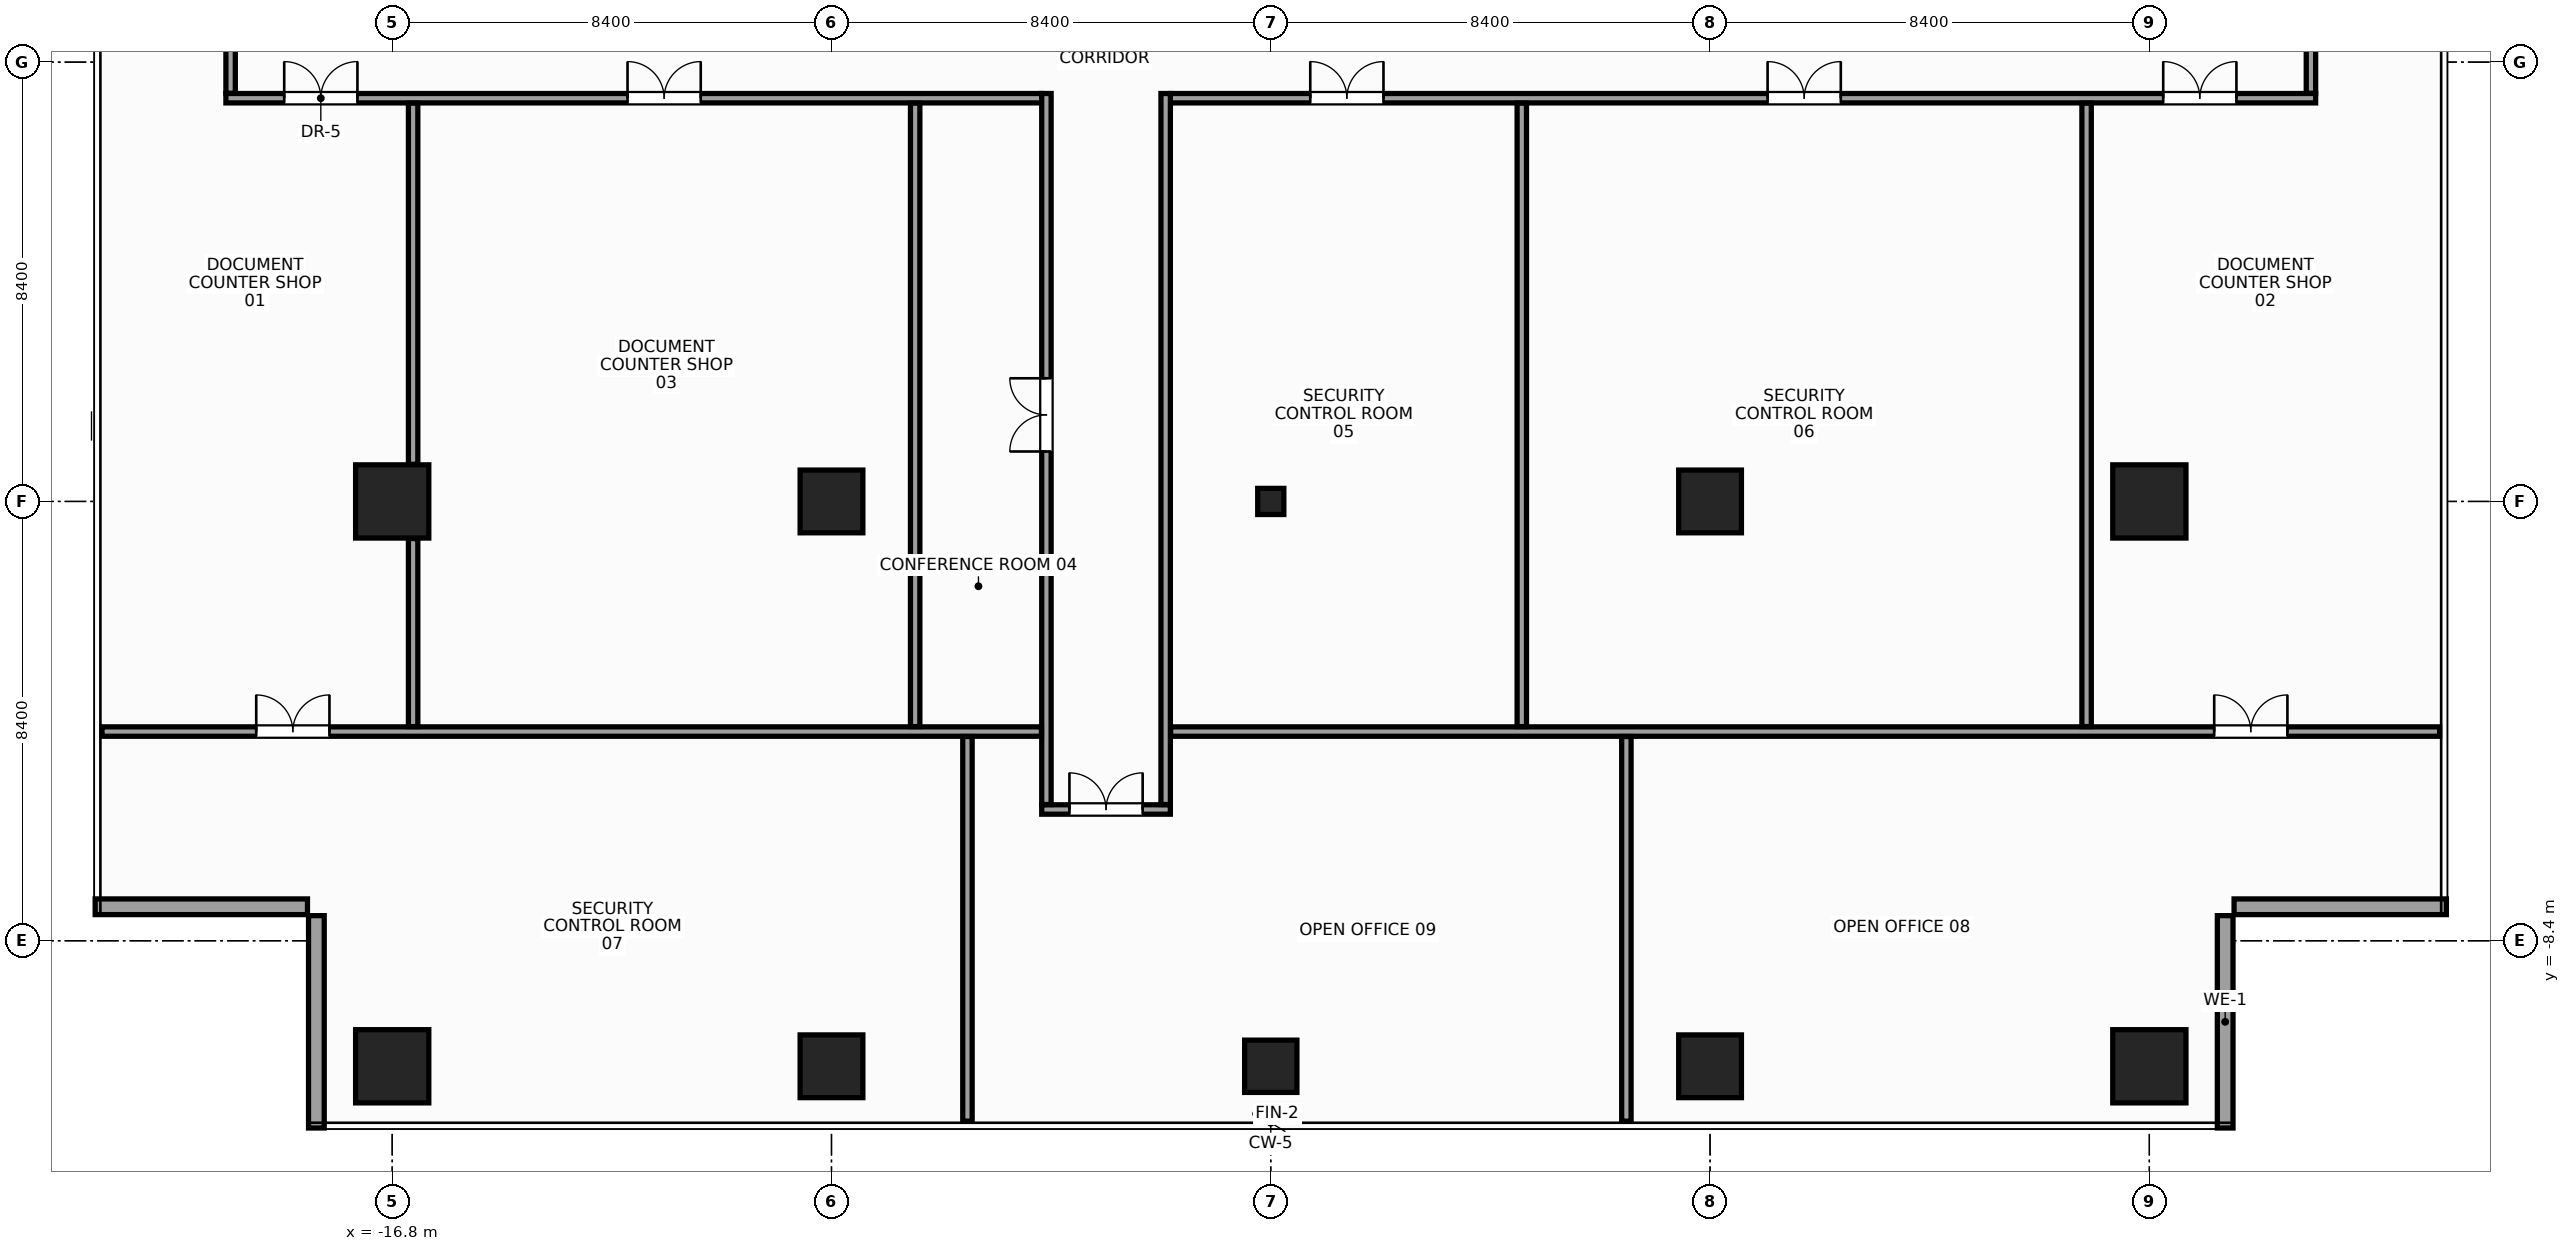
"""IFC4 building model, lengths in metres.
Left out: names, types, materials, properties, quantities, classifications, styles, units other than length and angle.
Written with IfcOpenShell. Run it as: python <this file> out.ifc"""

import sys

from ifc_helpers import new_model, si_unit, direction, frame, frame_2d, origin, origin_with_axes, origin_2d, place, context, subcontext, project, spatial, rectangle, hollow_rectangle, extrude, source, transform, mapped, element, fill, save


model = new_model("IFC4")
c1 = context("Model", 3, precision=1e-05, world=origin(), true_north=direction((0.0, 1.0)))
c2 = subcontext(c1, "Body", "Model", "MODEL_VIEW")
j1 = project(units=[si_unit("LENGTHUNIT", "METRE"), si_unit("PLANEANGLEUNIT", "RADIAN")], contexts=[c1])
p1 = place(None, origin())
s1 = spatial("IfcSite", under=j1, at=p1, CompositionType="ELEMENT")
p2 = place(p1, origin())
s2 = spatial("IfcBuilding", under=s1, at=p2, CompositionType="ELEMENT")
p3 = place(p2, frame((0.0, 0.0, 268.4)))
s3 = spatial("IfcBuildingStorey", under=s2, at=p3, CompositionType="ELEMENT", Elevation=268.4)
m1 = source(origin(), c2, "Body", "SweptSolid", [
    extrude(rectangle(XDim=1.4, YDim=1.4, at=origin_2d()), origin(), (0.0, 0.0, 1.0), 3.6),
])
for number, where, z_axis, x_axis in (
    (1, (-16.8, -10.8, 0.0), (0.0, 0.0, 1.0), (1.0, 0.0, 0.0)),
    (2, (-16.8, 0.0, 0.0), (0.0, 0.0, 1.0), (1.0, 0.0, 0.0)),
    (3, (16.8, -10.8, 0.0), (0.0, 0.0, 1.0), (1.0, 0.0, 0.0)),
    (4, (16.8, 0.0, 0.0), (0.0, 0.0, 1.0), (1.0, 0.0, 0.0)),
):
    element("IfcColumn", number, at=place(p3, frame(where, z_axis=z_axis, x_axis=x_axis)), inside=s3, PredefinedType="COLUMN", context=c2, shape_type="MappedRepresentation", body=[
        mapped(m1, transform((0.0, 0.0, 0.0), x_axis=(1.0, 0.0, 0.0), y_axis=(0.0, 1.0, 0.0), z_axis=(0.0, 0.0, 1.0), scale=1.0)),
    ])
m2 = source(origin(), c2, "Body", "SweptSolid", [
    extrude(rectangle(XDim=1.2, YDim=1.2, at=origin_2d()), origin(), (0.0, 0.0, 1.0), 3.6),
])
for number, where, z_axis, x_axis in (
    (5, (-8.4, 0.0, 0.0), (0.0, 0.0, 1.0), (1.0, 0.0, 0.0)),
    (6, (-8.4, -10.8, 0.0), (0.0, 0.0, 1.0), (1.0, 0.0, 0.0)),
    (7, (8.4, 0.0, 0.0), (0.0, 0.0, 1.0), (1.0, 0.0, 0.0)),
    (8, (8.4, -10.8, 0.0), (0.0, 0.0, 1.0), (1.0, 0.0, 0.0)),
):
    element("IfcColumn", number, at=place(p3, frame(where, z_axis=z_axis, x_axis=x_axis)), inside=s3, PredefinedType="COLUMN", context=c2, shape_type="MappedRepresentation", body=[
        mapped(m2, transform((0.0, 0.0, 0.0), x_axis=(1.0, 0.0, 0.0), y_axis=(0.0, 1.0, 0.0), z_axis=(0.0, 0.0, 1.0), scale=1.0)),
    ])
m3 = source(origin(), c2, "Body", "SweptSolid", [
    extrude(rectangle(XDim=1.0, YDim=1.0, at=origin_2d()), origin(), (0.0, 0.0, 1.0), 3.6),
])
p4 = place(p3, frame((0.0, -10.8, 0.0), z_axis=(0.0, 0.0, 1.0), x_axis=(1.0, 0.0, 0.0)))
e9 = element("IfcColumn", 9, at=p4, inside=s3, PredefinedType="COLUMN", context=c2, shape_type="MappedRepresentation", body=[
    mapped(m3, transform((0.0, 0.0, 0.0), x_axis=(1.0, 0.0, 0.0), y_axis=(0.0, 1.0, 0.0), z_axis=(0.0, 0.0, 1.0), scale=1.0)),
])
m4 = source(origin(), c2, "Body", "SweptSolid", [
    extrude(hollow_rectangle(XDim=0.5, YDim=0.5, WallThickness=0.025, at=origin_2d()), origin(), (0.0, 0.0, 1.0), 3.6),
])
p5 = place(p3, origin_with_axes())
e10 = element("IfcColumn", 10, at=p5, inside=s3, PredefinedType="COLUMN", context=c2, shape_type="MappedRepresentation", body=[
    mapped(m4, transform((0.0, 0.0, 0.0), x_axis=(1.0, 0.0, 0.0), y_axis=(0.0, 1.0, 0.0), z_axis=(0.0, 0.0, 1.0), scale=1.0)),
])
m5 = source(origin(), c2, "Body", "SweptSolid", [
    extrude(rectangle(XDim=4.06, YDim=0.3, at=frame_2d((2.03, 0.0))), origin(), (0.0, 0.0, 1.0), 2.75),
])
for number, where, z_axis, x_axis in (
    (11, (18.25, -11.98, 0.0), (0.0, 0.0, 1.0), (0.0, 1.0, 0.0)),
    (12, (18.42, -7.75, 0.0), (0.0, 0.0, 1.0), (1.0, 0.0, 0.0)),
    (13, (-22.48, -7.75, 0.0), (0.0, 0.0, 1.0), (1.0, 0.0, 0.0)),
    (14, (-18.25, -7.92, 0.0), (0.0, 0.0, 1.0), (0.0, -1.0, 0.0)),
):
    element("IfcWall", number, at=place(p3, frame(where, z_axis=z_axis, x_axis=x_axis)), inside=s3, PredefinedType="STANDARD", context=c2, shape_type="MappedRepresentation", body=[
        mapped(m5, transform((0.0, 0.0, 0.0), x_axis=(1.0, 0.0, 0.0), y_axis=(0.0, 1.0, 0.0), z_axis=(0.0, 0.0, 1.0), scale=1.0)),
    ])
m6 = source(origin(), c2, "Body", "SweptSolid", [
    extrude(rectangle(XDim=15.6, YDim=0.18, at=frame_2d((7.8, 0.0))), origin(), (0.0, 0.0, 1.0), 2.755),
])
p6 = place(p3, frame((-19.98, 7.71, 0.0), z_axis=(0.0, 0.0, 1.0), x_axis=(1.0, 0.0, 0.0)))
e15 = element("IfcWall", 15, at=p6, inside=s3, PredefinedType="PARTITIONING", context=c2, shape_type="MappedRepresentation", body=[
    mapped(m6, transform((0.0, 0.0, 0.0), x_axis=(1.0, 0.0, 0.0), y_axis=(0.0, 1.0, 0.0), z_axis=(0.0, 0.0, 1.0), scale=1.0)),
])
p7 = place(p6, frame((1.115, 0.0, 0.0)))
e16 = element("IfcOpeningElement", 16, at=p7, cuts=e15, PredefinedType="OPENING", context=c2, shape_type="SweptSolid", body=[
    extrude(rectangle(XDim=1.4, YDim=2.2, at=frame_2d((0.7, 1.1))), frame((0.0, 0.102, 0.0), z_axis=(0.0, -1.0, 0.0), x_axis=(1.0, 0.0, 0.0)), (0.0, 0.0, 1.0), 0.204),
])
p8 = place(p6, frame((7.68, 0.0, 0.0)))
e17 = element("IfcOpeningElement", 17, at=p8, cuts=e15, PredefinedType="OPENING", context=c2, shape_type="SweptSolid", body=[
    extrude(rectangle(XDim=1.4, YDim=2.2, at=frame_2d((0.7, 1.1))), frame((0.0, 0.102, 0.0), z_axis=(0.0, -1.0, 0.0), x_axis=(1.0, 0.0, 0.0)), (0.0, 0.0, 1.0), 0.204),
])
m7 = source(origin(), c2, "Body", "SweptSolid", [
    extrude(rectangle(XDim=21.9, YDim=0.18, at=frame_2d((10.95, 0.0))), origin(), (0.0, 0.0, 1.0), 2.755),
])
p9 = place(p3, frame((-1.92, 7.71, 0.0), z_axis=(0.0, 0.0, 1.0), x_axis=(1.0, 0.0, 0.0)))
e18 = element("IfcWall", 18, at=p9, inside=s3, PredefinedType="PARTITIONING", context=c2, shape_type="MappedRepresentation", body=[
    mapped(m7, transform((0.0, 0.0, 0.0), x_axis=(1.0, 0.0, 0.0), y_axis=(0.0, 1.0, 0.0), z_axis=(0.0, 0.0, 1.0), scale=1.0)),
])
p10 = place(p9, frame((18.985, 0.0, 0.0)))
e19 = element("IfcOpeningElement", 19, at=p10, cuts=e18, PredefinedType="OPENING", context=c2, shape_type="SweptSolid", body=[
    extrude(rectangle(XDim=1.4, YDim=2.2, at=frame_2d((0.7, 1.1))), frame((0.0, 0.102, 0.0), z_axis=(0.0, -1.0, 0.0), x_axis=(1.0, 0.0, 0.0)), (0.0, 0.0, 1.0), 0.204),
])
p11 = place(p9, frame((2.675, 0.0, 0.0)))
e20 = element("IfcOpeningElement", 20, at=p11, cuts=e18, PredefinedType="OPENING", context=c2, shape_type="SweptSolid", body=[
    extrude(rectangle(XDim=1.4, YDim=2.2, at=frame_2d((0.7, 1.1))), frame((0.0, 0.102, 0.0), z_axis=(0.0, -1.0, 0.0), x_axis=(1.0, 0.0, 0.0)), (0.0, 0.0, 1.0), 0.204),
])
p12 = place(p9, frame((11.42, 0.0, 0.0)))
e21 = element("IfcOpeningElement", 21, at=p12, cuts=e18, PredefinedType="OPENING", context=c2, shape_type="SweptSolid", body=[
    extrude(rectangle(XDim=1.4, YDim=2.2, at=frame_2d((0.7, 1.1))), frame((0.0, 0.102, 0.0), z_axis=(0.0, -1.0, 0.0), x_axis=(1.0, 0.0, 0.0)), (0.0, 0.0, 1.0), 0.204),
])
m8 = source(origin(), c2, "Body", "SweptSolid", [
    extrude(rectangle(XDim=2.46, YDim=0.18, at=frame_2d((1.23, 0.0))), origin(), (0.0, 0.0, 1.0), 3.37),
])
p13 = place(p3, frame((-4.38, -5.89, 0.0), z_axis=(0.0, 0.0, 1.0), x_axis=(1.0, 0.0, 0.0)))
e22 = element("IfcWall", 22, at=p13, inside=s3, PredefinedType="PARTITIONING", context=c2, shape_type="MappedRepresentation", body=[
    mapped(m8, transform((0.0, 0.0, 0.0), x_axis=(1.0, 0.0, 0.0), y_axis=(0.0, 1.0, 0.0), z_axis=(0.0, 0.0, 1.0), scale=1.0)),
])
p14 = place(p13, frame((0.53, 0.0, 0.0)))
e23 = element("IfcOpeningElement", 23, at=p14, cuts=e22, PredefinedType="OPENING", context=c2, shape_type="SweptSolid", body=[
    extrude(rectangle(XDim=1.4, YDim=2.2, at=frame_2d((0.7, 1.1))), frame((0.0, 0.102, 0.0), z_axis=(0.0, -1.0, 0.0), x_axis=(1.0, 0.0, 0.0)), (0.0, 0.0, 1.0), 0.204),
])
m9 = source(origin(), c2, "Body", "SweptSolid", [
    extrude(rectangle(XDim=2.1, YDim=0.18, at=frame_2d((1.05, 0.0))), origin(), (0.0, 0.0, 1.0), 3.37),
])
for number, where, z_axis, x_axis in (
    (24, (-19.89, 7.805, 0.0), (0.0, 0.0, 1.0), (0.0, 1.0, 0.0)),
    (25, (19.89, 7.805, 0.0), (0.0, 0.0, 1.0), (0.0, 1.0, 0.0)),
):
    element("IfcWall", number, at=place(p3, frame(where, z_axis=z_axis, x_axis=x_axis)), inside=s3, PredefinedType="PARTITIONING", context=c2, shape_type="MappedRepresentation", body=[
        mapped(m9, transform((0.0, 0.0, 0.0), x_axis=(1.0, 0.0, 0.0), y_axis=(0.0, 1.0, 0.0), z_axis=(0.0, 0.0, 1.0), scale=1.0)),
    ])
m10 = source(origin(), c2, "Body", "SweptSolid", [
    extrude(rectangle(XDim=13.595, YDim=0.18, at=frame_2d((6.797, 0.0))), origin(), (0.0, 0.0, 1.0), 2.655),
])
p15 = place(p3, frame((-4.29, -5.795, 0.0), z_axis=(0.0, 0.0, 1.0), x_axis=(0.0, 1.0, 0.0)))
e26 = element("IfcWall", 26, at=p15, inside=s3, PredefinedType="PARTITIONING", context=c2, shape_type="MappedRepresentation", body=[
    mapped(m10, transform((0.0, 0.0, 0.0), x_axis=(1.0, 0.0, 0.0), y_axis=(0.0, 1.0, 0.0), z_axis=(0.0, 0.0, 1.0), scale=1.0)),
])
p16 = place(p15, frame((6.75, 0.0, 0.0)))
e27 = element("IfcOpeningElement", 27, at=p16, cuts=e26, PredefinedType="OPENING", context=c2, shape_type="SweptSolid", body=[
    extrude(rectangle(XDim=1.4, YDim=2.2, at=frame_2d((0.7, 1.1))), frame((0.0, 0.102, 0.0), z_axis=(0.0, -1.0, 0.0), x_axis=(1.0, 0.0, 0.0)), (0.0, 0.0, 1.0), 0.204),
])
p17 = place(p3, frame((-2.01, -5.795, 0.0), z_axis=(0.0, 0.0, 1.0), x_axis=(0.0, 1.0, 0.0)))
e28 = element("IfcWall", 28, at=p17, inside=s3, PredefinedType="PARTITIONING", context=c2, shape_type="MappedRepresentation", body=[
    mapped(m10, transform((0.0, 0.0, 0.0), x_axis=(1.0, 0.0, 0.0), y_axis=(0.0, 1.0, 0.0), z_axis=(0.0, 0.0, 1.0), scale=1.0)),
])
m11 = source(origin(), c2, "Body", "SweptSolid", [
    extrude(rectangle(XDim=17.965, YDim=0.18, at=frame_2d((8.982, 0.0))), origin(), (0.0, 0.0, 1.0), 2.755),
])
p18 = place(p3, frame((-22.35, -4.4, 0.0), z_axis=(0.0, 0.0, 1.0), x_axis=(1.0, 0.0, 0.0)))
e29 = element("IfcWall", 29, at=p18, inside=s3, PredefinedType="PARTITIONING", context=c2, shape_type="MappedRepresentation", body=[
    mapped(m11, transform((0.0, 0.0, 0.0), x_axis=(1.0, 0.0, 0.0), y_axis=(0.0, 1.0, 0.0), z_axis=(0.0, 0.0, 1.0), scale=1.0)),
])
p19 = place(p18, frame((2.95, 0.0, 0.0)))
e30 = element("IfcOpeningElement", 30, at=p19, cuts=e29, PredefinedType="OPENING", context=c2, shape_type="SweptSolid", body=[
    extrude(rectangle(XDim=1.4, YDim=2.2, at=frame_2d((0.7, 1.1))), frame((0.0, 0.102, 0.0), z_axis=(0.0, -1.0, 0.0), x_axis=(1.0, 0.0, 0.0)), (0.0, 0.0, 1.0), 0.204),
])
m12 = source(origin(), c2, "Body", "SweptSolid", [
    extrude(rectangle(XDim=24.265, YDim=0.18, at=frame_2d((12.133, 0.0))), origin(), (0.0, 0.0, 1.0), 2.755),
])
p20 = place(p3, frame((-1.915, -4.4, 0.0), z_axis=(0.0, 0.0, 1.0), x_axis=(1.0, 0.0, 0.0)))
e31 = element("IfcWall", 31, at=p20, inside=s3, PredefinedType="PARTITIONING", context=c2, shape_type="MappedRepresentation", body=[
    mapped(m12, transform((0.0, 0.0, 0.0), x_axis=(1.0, 0.0, 0.0), y_axis=(0.0, 1.0, 0.0), z_axis=(0.0, 0.0, 1.0), scale=1.0)),
])
p21 = place(p20, frame((19.955, 0.0, 0.0)))
e32 = element("IfcOpeningElement", 32, at=p21, cuts=e31, PredefinedType="OPENING", context=c2, shape_type="SweptSolid", body=[
    extrude(rectangle(XDim=1.4, YDim=2.2, at=frame_2d((0.7, 1.1))), frame((0.0, 0.102, 0.0), z_axis=(0.0, -1.0, 0.0), x_axis=(1.0, 0.0, 0.0)), (0.0, 0.0, 1.0), 0.204),
])
m13 = source(origin(), c2, "Body", "SweptSolid", [
    extrude(rectangle(XDim=3.595, YDim=0.18, at=frame_2d((1.797, 0.0))), origin(), (0.0, 0.0, 1.0), 3.37),
])
p22 = place(p3, frame((-16.4, -4.305, 0.0), z_axis=(0.0, 0.0, 1.0), x_axis=(0.0, 1.0, 0.0)))
e33 = element("IfcWall", 33, at=p22, inside=s3, PredefinedType="PARTITIONING", context=c2, shape_type="MappedRepresentation", body=[
    mapped(m13, transform((0.0, 0.0, 0.0), x_axis=(1.0, 0.0, 0.0), y_axis=(0.0, 1.0, 0.0), z_axis=(0.0, 0.0, 1.0), scale=1.0)),
])
m14 = source(origin(), c2, "Body", "SweptSolid", [
    extrude(rectangle(XDim=6.905, YDim=0.18, at=frame_2d((3.453, 0.0))), origin(), (0.0, 0.0, 1.0), 2.655),
])
p23 = place(p3, frame((-16.4, 0.71, 0.0), z_axis=(0.0, 0.0, 1.0), x_axis=(0.0, 1.0, 0.0)))
e34 = element("IfcWall", 34, at=p23, inside=s3, PredefinedType="PARTITIONING", context=c2, shape_type="MappedRepresentation", body=[
    mapped(m14, transform((0.0, 0.0, 0.0), x_axis=(1.0, 0.0, 0.0), y_axis=(0.0, 1.0, 0.0), z_axis=(0.0, 0.0, 1.0), scale=1.0)),
])
m15 = source(origin(), c2, "Body", "SweptSolid", [
    extrude(rectangle(XDim=11.92, YDim=0.18, at=frame_2d((5.96, 0.0))), origin(), (0.0, 0.0, 1.0), 2.655),
])
for number, where, z_axis, x_axis in (
    (35, (-6.8, -4.305, 0.0), (0.0, 0.0, 1.0), (0.0, 1.0, 0.0)),
    (36, (4.8, -4.305, 0.0), (0.0, 0.0, 1.0), (0.0, 1.0, 0.0)),
    (37, (15.6, -4.305, 0.0), (0.0, 0.0, 1.0), (0.0, 1.0, 0.0)),
):
    element("IfcWall", number, at=place(p3, frame(where, z_axis=z_axis, x_axis=x_axis)), inside=s3, PredefinedType="PARTITIONING", context=c2, shape_type="MappedRepresentation", body=[
        mapped(m15, transform((0.0, 0.0, 0.0), x_axis=(1.0, 0.0, 0.0), y_axis=(0.0, 1.0, 0.0), z_axis=(0.0, 0.0, 1.0), scale=1.0)),
    ])
m16 = source(origin(), c2, "Body", "SweptSolid", [
    extrude(rectangle(XDim=7.355, YDim=0.18, at=frame_2d((3.677, 0.0))), origin(), (0.0, 0.0, 1.0), 2.905),
])
for number, where, z_axis, x_axis in (
    (38, (-5.8, -11.85, 0.0), (0.0, 0.0, 1.0), (0.0, 1.0, 0.0)),
    (39, (6.8, -11.85, 0.0), (0.0, 0.0, 1.0), (0.0, 1.0, 0.0)),
):
    element("IfcWall", number, at=place(p3, frame(where, z_axis=z_axis, x_axis=x_axis)), inside=s3, PredefinedType="PARTITIONING", context=c2, shape_type="MappedRepresentation", body=[
        mapped(m16, transform((0.0, 0.0, 0.0), x_axis=(1.0, 0.0, 0.0), y_axis=(0.0, 1.0, 0.0), z_axis=(0.0, 0.0, 1.0), scale=1.0)),
    ])
m17 = source(origin(), c2, "Body", "SweptSolid", [
    extrude(rectangle(XDim=1.4, YDim=2.2, at=frame_2d((0.7, 1.1))), frame((0.0, 0.025, 0.0), z_axis=(0.0, -1.0, 0.0), x_axis=(1.0, 0.0, 0.0)), (0.0, 0.0, 1.0), 0.05),
])
p24 = place(p7, origin())
e40 = element("IfcDoor", 40, at=p24, inside=s3, OperationType="DOUBLE_DOOR_SINGLE_SWING", PredefinedType="DOOR", context=c2, shape_type="MappedRepresentation", body=[
    mapped(m17, transform((0.0, 0.0, 0.0), x_axis=(1.0, 0.0, 0.0), y_axis=(0.0, 1.0, 0.0), z_axis=(0.0, 0.0, 1.0), scale=1.0)),
])
fill(e16, e40)
p25 = place(p10, origin())
e41 = element("IfcDoor", 41, at=p25, inside=s3, OperationType="DOUBLE_DOOR_SINGLE_SWING", PredefinedType="DOOR", context=c2, shape_type="MappedRepresentation", body=[
    mapped(m17, transform((0.0, 0.0, 0.0), x_axis=(1.0, 0.0, 0.0), y_axis=(0.0, 1.0, 0.0), z_axis=(0.0, 0.0, 1.0), scale=1.0)),
])
fill(e19, e41)
p26 = place(p8, origin())
e42 = element("IfcDoor", 42, at=p26, inside=s3, OperationType="DOUBLE_DOOR_SINGLE_SWING", PredefinedType="DOOR", context=c2, shape_type="MappedRepresentation", body=[
    mapped(m17, transform((0.0, 0.0, 0.0), x_axis=(1.0, 0.0, 0.0), y_axis=(0.0, 1.0, 0.0), z_axis=(0.0, 0.0, 1.0), scale=1.0)),
])
fill(e17, e42)
p27 = place(p16, origin())
e43 = element("IfcDoor", 43, at=p27, inside=s3, OperationType="DOUBLE_DOOR_SINGLE_SWING", PredefinedType="DOOR", context=c2, shape_type="MappedRepresentation", body=[
    mapped(m17, transform((0.0, 0.0, 0.0), x_axis=(1.0, 0.0, 0.0), y_axis=(0.0, 1.0, 0.0), z_axis=(0.0, 0.0, 1.0), scale=1.0)),
])
fill(e27, e43)
p28 = place(p11, origin())
e44 = element("IfcDoor", 44, at=p28, inside=s3, OperationType="DOUBLE_DOOR_SINGLE_SWING", PredefinedType="DOOR", context=c2, shape_type="MappedRepresentation", body=[
    mapped(m17, transform((0.0, 0.0, 0.0), x_axis=(1.0, 0.0, 0.0), y_axis=(0.0, 1.0, 0.0), z_axis=(0.0, 0.0, 1.0), scale=1.0)),
])
fill(e20, e44)
p29 = place(p12, origin())
e45 = element("IfcDoor", 45, at=p29, inside=s3, OperationType="DOUBLE_DOOR_SINGLE_SWING", PredefinedType="DOOR", context=c2, shape_type="MappedRepresentation", body=[
    mapped(m17, transform((0.0, 0.0, 0.0), x_axis=(1.0, 0.0, 0.0), y_axis=(0.0, 1.0, 0.0), z_axis=(0.0, 0.0, 1.0), scale=1.0)),
])
fill(e21, e45)
p30 = place(p14, origin())
e46 = element("IfcDoor", 46, at=p30, inside=s3, OperationType="DOUBLE_DOOR_SINGLE_SWING", PredefinedType="DOOR", context=c2, shape_type="MappedRepresentation", body=[
    mapped(m17, transform((0.0, 0.0, 0.0), x_axis=(1.0, 0.0, 0.0), y_axis=(0.0, 1.0, 0.0), z_axis=(0.0, 0.0, 1.0), scale=1.0)),
])
fill(e23, e46)
p31 = place(p19, origin())
e47 = element("IfcDoor", 47, at=p31, inside=s3, OperationType="DOUBLE_DOOR_SINGLE_SWING", PredefinedType="DOOR", context=c2, shape_type="MappedRepresentation", body=[
    mapped(m17, transform((0.0, 0.0, 0.0), x_axis=(1.0, 0.0, 0.0), y_axis=(0.0, 1.0, 0.0), z_axis=(0.0, 0.0, 1.0), scale=1.0)),
])
fill(e30, e47)
p32 = place(p21, origin())
e48 = element("IfcDoor", 48, at=p32, inside=s3, OperationType="DOUBLE_DOOR_SINGLE_SWING", PredefinedType="DOOR", context=c2, shape_type="MappedRepresentation", body=[
    mapped(m17, transform((0.0, 0.0, 0.0), x_axis=(1.0, 0.0, 0.0), y_axis=(0.0, 1.0, 0.0), z_axis=(0.0, 0.0, 1.0), scale=1.0)),
])
fill(e32, e48)
save(model, sys.argv[1])
